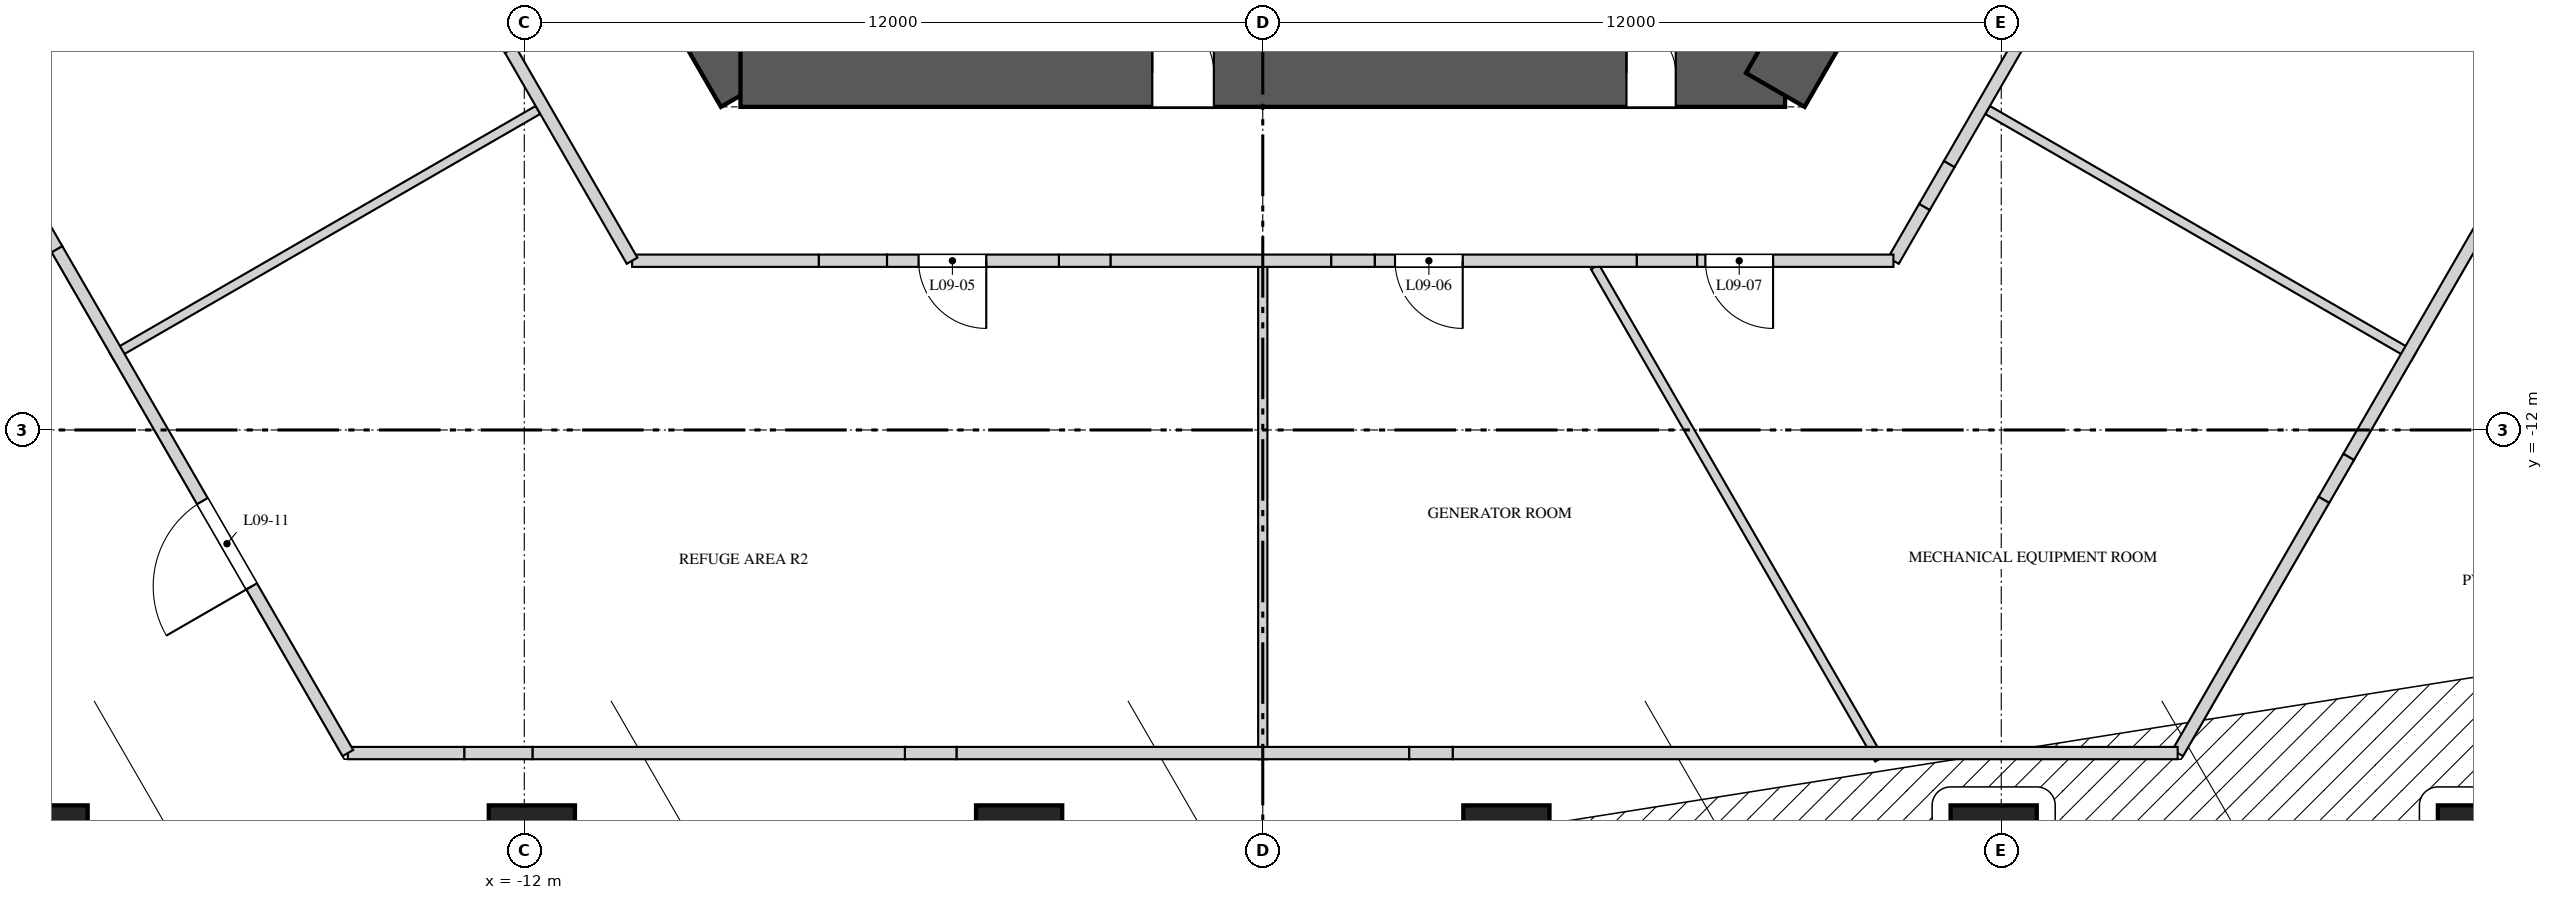
"""IFC4 building model, lengths in metres.
Left out: names, types, materials, properties, quantities, classifications, styles, units other than length and angle.
Written with IfcOpenShell. Run it as: python <this file> out.ifc"""

import sys

from ifc_helpers import new_model, si_unit, direction, frame, frame_2d, origin, origin_2d, place, context, subcontext, project, spatial, rectangle, extrude, element, fill, save


model = new_model("IFC4")
c1 = context("Model", 3, precision=1e-05, world=origin(), true_north=direction((0.0, 1.0)))
c2 = subcontext(c1, "Body", "Model", "MODEL_VIEW")
j1 = project(units=[si_unit("LENGTHUNIT", "METRE"), si_unit("PLANEANGLEUNIT", "RADIAN")], contexts=[c1])
p1 = place(None, origin())
s1 = spatial("IfcSite", under=j1, at=p1, CompositionType="ELEMENT")
p2 = place(p1, origin())
s2 = spatial("IfcBuilding", under=s1, at=p2, CompositionType="ELEMENT")
p3 = place(p2, frame((0.0, 0.0, 46.0)))
s3 = spatial("IfcBuildingStorey", under=s2, at=p3, CompositionType="ELEMENT", Elevation=46.0)
p4 = place(p3, frame((-9.772, -3.975, 0.0), z_axis=(0.0, 0.0, 1.0), x_axis=(0.499995765644, -0.866027848477, 0.0)))
e1 = element("IfcWall", 1, at=p4, inside=s3, PredefinedType="SHEAR", context=c2, shape_type="SweptSolid", body=[
    extrude(rectangle(XDim=2.887, YDim=1.1, at=frame_2d((1.443, 0.0))), origin(), (0.0, 0.0, 1.0), 5.2),
])
p5 = place(p3, frame((-8.487, -6.2, 0.0), z_axis=(0.0, 0.0, 1.0), x_axis=(1.0, 0.0, 0.0)))
e2 = element("IfcWall", 2, at=p5, inside=s3, PredefinedType="SHEAR", context=c2, shape_type="SweptSolid", body=[
    extrude(rectangle(XDim=16.974, YDim=1.1, at=frame_2d((8.487, 0.0))), origin(), (0.0, 0.0, 1.0), 5.2),
])
p6 = place(p5, frame((6.692, 0.0, 0.0)))
e3 = element("IfcOpeningElement", 3, at=p6, cuts=e2, PredefinedType="OPENING", context=c2, shape_type="SweptSolid", body=[
    extrude(rectangle(XDim=1.0, YDim=2.4, at=frame_2d((0.5, 1.2))), frame((0.0, 0.56, 0.0), z_axis=(0.0, -1.0, 0.0), x_axis=(1.0, 0.0, 0.0)), (0.0, 0.0, 1.0), 1.12),
])
p7 = place(p5, frame((14.397, 0.0, 0.0)))
e4 = element("IfcOpeningElement", 4, at=p7, cuts=e2, PredefinedType="OPENING", context=c2, shape_type="SweptSolid", body=[
    extrude(rectangle(XDim=0.8, YDim=2.1, at=frame_2d((0.4, 1.05))), frame((0.0, 0.56, 0.0), z_axis=(0.0, -1.0, 0.0), x_axis=(1.0, 0.0, 0.0)), (0.0, 0.0, 1.0), 1.12),
])
p8 = place(p3, frame((8.328, -6.475, 0.0), z_axis=(0.0, 0.0, 1.0), x_axis=(0.499995765644, 0.866027848477, 0.0)))
e5 = element("IfcWall", 5, at=p8, inside=s3, PredefinedType="SHEAR", context=c2, shape_type="SweptSolid", body=[
    extrude(rectangle(XDim=2.887, YDim=1.1, at=frame_2d((1.443, 0.0))), origin(), (0.0, 0.0, 1.0), 5.2),
])
for number, where, z_axis, x_axis in (
    (6, (-19.795, -18.55, 0.0), (0.0, 0.0, 1.0), (1.0, 0.0, 0.0)),
    (7, (-11.877, -18.55, 0.0), (0.0, 0.0, 1.0), (1.0, 0.0, 0.0)),
    (8, (-3.959, -18.55, 0.0), (0.0, 0.0, 1.0), (1.0, 0.0, 0.0)),
    (9, (3.959, -18.55, 0.0), (0.0, 0.0, 1.0), (1.0, 0.0, 0.0)),
    (10, (11.877, -18.55, 0.0), (0.0, 0.0, 1.0), (1.0, 0.0, 0.0)),
    (11, (19.795, -18.55, 0.0), (0.0, 0.0, 1.0), (1.0, 0.0, 0.0)),
):
    element("IfcColumn", number, at=place(p3, frame(where, z_axis=z_axis, x_axis=x_axis)), inside=s3, PredefinedType="COLUMN", context=c2, shape_type="SweptSolid", body=[
        extrude(rectangle(XDim=1.4, YDim=0.9, at=origin_2d()), origin(), (0.0, 0.0, 1.0), 2.898),
    ])
for number, where, z_axis, x_axis in (
    (12, (-11.778, -6.8, 0.0), (0.0, 0.0, 1.0), (-0.866, -0.5, 0.0)),
    (13, (0.0, -9.35, 0.0), (0.0, 0.0, 1.0), (0.0, -1.0, 0.0)),
):
    element("IfcWall", number, at=place(p3, frame(where, z_axis=z_axis, x_axis=x_axis)), inside=s3, PredefinedType="PARTITIONING", context=c2, shape_type="SweptSolid", body=[
        extrude(rectangle(XDim=8.0, YDim=0.15, at=frame_2d((4.0, 0.0))), origin(), (0.0, 0.0, 1.0), 4.85),
    ])
p9 = place(p3, frame((5.398, -9.35, 0.0), z_axis=(0.0, 0.0, 1.0), x_axis=(0.500007658653, -0.866020982014, 0.0)))
e14 = element("IfcWall", 14, at=p9, inside=s3, PredefinedType="PARTITIONING", context=c2, shape_type="SweptSolid", body=[
    extrude(rectangle(XDim=9.238, YDim=0.15, at=frame_2d((4.619, 0.0))), origin(), (0.0, 0.0, 1.0), 4.85),
])
p10 = place(p3, frame((11.778, -6.8, 0.0), z_axis=(0.0, 0.0, 1.0), x_axis=(0.866026010844, -0.49999894854, 0.0)))
e15 = element("IfcWall", 15, at=p10, inside=s3, PredefinedType="PARTITIONING", context=c2, shape_type="SweptSolid", body=[
    extrude(rectangle(XDim=8.0, YDim=0.15, at=frame_2d((4.0, 0.0))), origin(), (0.0, 0.0, 1.0), 4.85),
])
p11 = place(p3, frame((13.135, -4.25, 0.0), z_axis=(0.0, 0.0, 1.0), x_axis=(-0.499983883921, -0.866034708207, 0.0)))
e16 = element("IfcWall", 16, at=p11, inside=s3, PredefinedType="SOLIDWALL", context=c2, shape_type="SweptSolid", body=[
    extrude(rectangle(XDim=3.961, YDim=0.2, at=frame_2d((1.98, 0.0))), origin(), (0.0, 0.0, 1.0), 4.85),
])
p12 = place(p3, frame((11.154, -7.68, 0.0), z_axis=(0.0, 0.0, 1.0), x_axis=(-0.500151261923, -0.865938055058, 0.0)))
e17 = element("IfcWall", 17, at=p12, inside=s3, PredefinedType="SOLIDWALL", context=c2, shape_type="SweptSolid", body=[
    extrude(rectangle(XDim=0.805, YDim=0.2, at=frame_2d((0.402, 0.0))), origin(), (0.0, 0.0, 1.0), 3.95),
])
p13 = place(p3, frame((10.752, -8.377, 0.0), z_axis=(0.0, 0.0, 1.0), x_axis=(-0.499918237861, -0.866072604031, 0.0)))
e18 = element("IfcWall", 18, at=p13, inside=s3, PredefinedType="SOLIDWALL", context=c2, shape_type="SweptSolid", body=[
    extrude(rectangle(XDim=1.008, YDim=0.2, at=frame_2d((0.504, 0.0))), origin(), (0.0, 0.0, 1.0), 4.85),
])
p14 = place(p3, frame((10.248, -9.25, 0.0), z_axis=(0.0, 0.0, 1.0), x_axis=(-1.0, 0.0, 0.0)))
e19 = element("IfcWall", 19, at=p14, inside=s3, PredefinedType="SOLIDWALL", context=c2, shape_type="SweptSolid", body=[
    extrude(rectangle(XDim=3.191, YDim=0.2, at=frame_2d((1.595, 0.0))), origin(), (0.0, 0.0, 1.0), 4.85),
])
p15 = place(p14, frame((1.956, 0.0, 0.0)))
e20 = element("IfcOpeningElement", 20, at=p15, cuts=e19, PredefinedType="OPENING", context=c2, shape_type="SweptSolid", body=[
    extrude(rectangle(XDim=1.1, YDim=2.2, at=frame_2d((0.55, 1.1))), frame((0.0, 0.11, 0.0), z_axis=(0.0, -1.0, 0.0), x_axis=(1.0, 0.0, 0.0)), (0.0, 0.0, 1.0), 0.22),
])
p16 = place(p3, frame((7.057, -9.25, 0.0), z_axis=(0.0, 0.0, 1.0), x_axis=(-1.0, 0.0, 0.0)))
e21 = element("IfcWall", 21, at=p16, inside=s3, PredefinedType="SOLIDWALL", context=c2, shape_type="SweptSolid", body=[
    extrude(rectangle(XDim=0.981, YDim=0.2, at=frame_2d((0.491, 0.0))), origin(), (0.0, 0.0, 1.0), 3.95),
])
p17 = place(p3, frame((6.076, -9.25, 0.0), z_axis=(0.0, 0.0, 1.0), x_axis=(-1.0, 0.0, 0.0)))
e22 = element("IfcWall", 22, at=p17, inside=s3, PredefinedType="SOLIDWALL", context=c2, shape_type="SweptSolid", body=[
    extrude(rectangle(XDim=4.257, YDim=0.2, at=frame_2d((2.128, 0.0))), origin(), (0.0, 0.0, 1.0), 4.85),
])
p18 = place(p17, frame((2.827, 0.0, 0.0)))
e23 = element("IfcOpeningElement", 23, at=p18, cuts=e22, PredefinedType="OPENING", context=c2, shape_type="SweptSolid", body=[
    extrude(rectangle(XDim=1.1, YDim=2.2, at=frame_2d((0.55, 1.1))), frame((0.0, 0.11, 0.0), z_axis=(0.0, -1.0, 0.0), x_axis=(1.0, 0.0, 0.0)), (0.0, 0.0, 1.0), 0.22),
])
p19 = place(p3, frame((1.819, -9.25, 0.0), z_axis=(0.0, 0.0, 1.0), x_axis=(-1.0, 0.0, 0.0)))
e24 = element("IfcWall", 24, at=p19, inside=s3, PredefinedType="SOLIDWALL", context=c2, shape_type="SweptSolid", body=[
    extrude(rectangle(XDim=0.709, YDim=0.2, at=frame_2d((0.354, 0.0))), origin(), (0.0, 0.0, 1.0), 4.15),
])
p20 = place(p3, frame((1.111, -9.25, 0.0), z_axis=(0.0, 0.0, 1.0), x_axis=(-1.0, 0.0, 0.0)))
e25 = element("IfcWall", 25, at=p20, inside=s3, PredefinedType="SOLIDWALL", context=c2, shape_type="SweptSolid", body=[
    extrude(rectangle(XDim=3.585, YDim=0.2, at=frame_2d((1.792, 0.0))), origin(), (0.0, 0.0, 1.0), 4.85),
])
p21 = place(p3, frame((-2.475, -9.25, 0.0), z_axis=(0.0, 0.0, 1.0), x_axis=(-1.0, 0.0, 0.0)))
e26 = element("IfcWall", 26, at=p21, inside=s3, PredefinedType="SOLIDWALL", context=c2, shape_type="SweptSolid", body=[
    extrude(rectangle(XDim=0.838, YDim=0.2, at=frame_2d((0.419, 0.0))), origin(), (0.0, 0.0, 1.0), 3.95),
])
p22 = place(p3, frame((-3.313, -9.25, 0.0), z_axis=(0.0, 0.0, 1.0), x_axis=(-1.0, 0.0, 0.0)))
e27 = element("IfcWall", 27, at=p22, inside=s3, PredefinedType="SOLIDWALL", context=c2, shape_type="SweptSolid", body=[
    extrude(rectangle(XDim=2.794, YDim=0.2, at=frame_2d((1.397, 0.0))), origin(), (0.0, 0.0, 1.0), 4.85),
])
p23 = place(p22, frame((1.18, 0.0, 0.0)))
e28 = element("IfcOpeningElement", 28, at=p23, cuts=e27, PredefinedType="OPENING", context=c2, shape_type="SweptSolid", body=[
    extrude(rectangle(XDim=1.1, YDim=2.2, at=frame_2d((0.55, 1.1))), frame((0.0, 0.11, 0.0), z_axis=(0.0, -1.0, 0.0), x_axis=(1.0, 0.0, 0.0)), (0.0, 0.0, 1.0), 0.22),
])
p24 = place(p3, frame((-6.106, -9.25, 0.0), z_axis=(0.0, 0.0, 1.0), x_axis=(-1.0, 0.0, 0.0)))
e29 = element("IfcWall", 29, at=p24, inside=s3, PredefinedType="SOLIDWALL", context=c2, shape_type="SweptSolid", body=[
    extrude(rectangle(XDim=1.109, YDim=0.2, at=frame_2d((0.554, 0.0))), origin(), (0.0, 0.0, 1.0), 3.75),
])
p25 = place(p3, frame((-7.215, -9.25, 0.0), z_axis=(0.0, 0.0, 1.0), x_axis=(-1.0, 0.0, 0.0)))
e30 = element("IfcWall", 30, at=p25, inside=s3, PredefinedType="SOLIDWALL", context=c2, shape_type="SweptSolid", body=[
    extrude(rectangle(XDim=3.033, YDim=0.2, at=frame_2d((1.516, 0.0))), origin(), (0.0, 0.0, 1.0), 4.85),
])
p26 = place(p3, frame((-10.248, -9.25, 0.0), z_axis=(0.0, 0.0, 1.0), x_axis=(-0.499983883921, 0.866034708207, 0.0)))
e31 = element("IfcWall", 31, at=p26, inside=s3, PredefinedType="SOLIDWALL", context=c2, shape_type="SweptSolid", body=[
    extrude(rectangle(XDim=3.961, YDim=0.2, at=frame_2d((1.98, 0.0))), origin(), (0.0, 0.0, 1.0), 4.85),
])
p27 = place(p3, frame((-12.229, -5.82, 0.0), z_axis=(0.0, 0.0, 1.0), x_axis=(-0.499923776705, 0.866069406852, 0.0)))
e32 = element("IfcWall", 32, at=p27, inside=s3, PredefinedType="SOLIDWALL", context=c2, shape_type="SweptSolid", body=[
    extrude(rectangle(XDim=0.805, YDim=0.2, at=frame_2d((0.402, 0.0))), origin(), (0.0, 0.0, 1.0), 3.95),
])
p28 = place(p3, frame((22.372, -4.25, 0.0), z_axis=(0.0, 0.0, 1.0), x_axis=(-0.50000482836, -0.866022616111, 0.0)))
e33 = element("IfcWall", 33, at=p28, inside=s3, PredefinedType="SOLIDWALL", context=c2, shape_type="SweptSolid", body=[
    extrude(rectangle(XDim=9.455, YDim=0.2, at=frame_2d((4.728, 0.0))), origin(), (0.0, 0.0, 1.0), 4.85),
])
p29 = place(p3, frame((17.645, -12.438, 0.0), z_axis=(0.0, 0.0, 1.0), x_axis=(-0.499923776705, -0.866069406852, 0.0)))
e34 = element("IfcWall", 34, at=p29, inside=s3, PredefinedType="SOLIDWALL", context=c2, shape_type="SweptSolid", body=[
    extrude(rectangle(XDim=0.805, YDim=0.2, at=frame_2d((0.402, 0.0))), origin(), (0.0, 0.0, 1.0), 3.95),
])
p30 = place(p3, frame((17.242, -13.135, 0.0), z_axis=(0.0, 0.0, 1.0), x_axis=(-0.500013047366, -0.866017870753, 0.0)))
e35 = element("IfcWall", 35, at=p30, inside=s3, PredefinedType="SOLIDWALL", context=c2, shape_type="SweptSolid", body=[
    extrude(rectangle(XDim=4.751, YDim=0.2, at=frame_2d((2.375, 0.0))), origin(), (0.0, 0.0, 1.0), 4.85),
])
p31 = place(p3, frame((14.867, -17.25, 0.0), z_axis=(0.0, 0.0, 1.0), x_axis=(-1.0, 0.0, 0.0)))
e36 = element("IfcWall", 36, at=p31, inside=s3, PredefinedType="SOLIDWALL", context=c2, shape_type="SweptSolid", body=[
    extrude(rectangle(XDim=11.78, YDim=0.2, at=frame_2d((5.89, 0.0))), origin(), (0.0, 0.0, 1.0), 4.85),
])
p32 = place(p3, frame((3.086, -17.25, 0.0), z_axis=(0.0, 0.0, 1.0), x_axis=(-1.0, 0.0, 0.0)))
e37 = element("IfcWall", 37, at=p32, inside=s3, PredefinedType="SOLIDWALL", context=c2, shape_type="SweptSolid", body=[
    extrude(rectangle(XDim=0.709, YDim=0.2, at=frame_2d((0.354, 0.0))), origin(), (0.0, 0.0, 1.0), 4.15),
])
p33 = place(p3, frame((2.378, -17.25, 0.0), z_axis=(0.0, 0.0, 1.0), x_axis=(-1.0, 0.0, 0.0)))
e38 = element("IfcWall", 38, at=p33, inside=s3, PredefinedType="SOLIDWALL", context=c2, shape_type="SweptSolid", body=[
    extrude(rectangle(XDim=7.355, YDim=0.2, at=frame_2d((3.677, 0.0))), origin(), (0.0, 0.0, 1.0), 4.85),
])
p34 = place(p3, frame((-4.977, -17.25, 0.0), z_axis=(0.0, 0.0, 1.0), x_axis=(-1.0, 0.0, 0.0)))
e39 = element("IfcWall", 39, at=p34, inside=s3, PredefinedType="SOLIDWALL", context=c2, shape_type="SweptSolid", body=[
    extrude(rectangle(XDim=0.838, YDim=0.2, at=frame_2d((0.419, 0.0))), origin(), (0.0, 0.0, 1.0), 3.95),
])
p35 = place(p3, frame((-5.815, -17.25, 0.0), z_axis=(0.0, 0.0, 1.0), x_axis=(-1.0, 0.0, 0.0)))
e40 = element("IfcWall", 40, at=p35, inside=s3, PredefinedType="SOLIDWALL", context=c2, shape_type="SweptSolid", body=[
    extrude(rectangle(XDim=6.052, YDim=0.2, at=frame_2d((3.026, 0.0))), origin(), (0.0, 0.0, 1.0), 4.85),
])
p36 = place(p3, frame((-11.867, -17.25, 0.0), z_axis=(0.0, 0.0, 1.0), x_axis=(-1.0, 0.0, 0.0)))
e41 = element("IfcWall", 41, at=p36, inside=s3, PredefinedType="SOLIDWALL", context=c2, shape_type="SweptSolid", body=[
    extrude(rectangle(XDim=1.109, YDim=0.2, at=frame_2d((0.554, 0.0))), origin(), (0.0, 0.0, 1.0), 3.75),
])
p37 = place(p3, frame((-12.976, -17.25, 0.0), z_axis=(0.0, 0.0, 1.0), x_axis=(-1.0, 0.0, 0.0)))
e42 = element("IfcWall", 42, at=p37, inside=s3, PredefinedType="SOLIDWALL", context=c2, shape_type="SweptSolid", body=[
    extrude(rectangle(XDim=1.891, YDim=0.2, at=frame_2d((0.945, 0.0))), origin(), (0.0, 0.0, 1.0), 4.85),
])
p38 = place(p3, frame((-14.867, -17.25, 0.0), z_axis=(0.0, 0.0, 1.0), x_axis=(-0.50000482836, 0.866022616111, 0.0)))
e43 = element("IfcWall", 43, at=p38, inside=s3, PredefinedType="SOLIDWALL", context=c2, shape_type="SweptSolid", body=[
    extrude(rectangle(XDim=9.455, YDim=0.2, at=frame_2d((4.728, 0.0))), origin(), (0.0, 0.0, 1.0), 4.85),
])
p39 = place(p38, frame((3.128, 0.0, 0.0)))
e44 = element("IfcOpeningElement", 44, at=p39, cuts=e43, PredefinedType="OPENING", context=c2, shape_type="SweptSolid", body=[
    extrude(rectangle(XDim=1.6, YDim=2.3, at=frame_2d((0.8, 1.15))), frame((0.0, 0.11, 0.0), z_axis=(0.0, -1.0, 0.0), x_axis=(1.0, 0.0, 0.0)), (0.0, 0.0, 1.0), 0.22),
])
p40 = place(p3, frame((-19.594, -9.062, 0.0), z_axis=(0.0, 0.0, 1.0), x_axis=(-0.499923776705, 0.866069406852, 0.0)))
e45 = element("IfcWall", 45, at=p40, inside=s3, PredefinedType="SOLIDWALL", context=c2, shape_type="SweptSolid", body=[
    extrude(rectangle(XDim=0.805, YDim=0.2, at=frame_2d((0.402, 0.0))), origin(), (0.0, 0.0, 1.0), 3.95),
])
p41 = place(p6, origin())
e46 = element("IfcDoor", 46, at=p41, inside=s3, OperationType="SINGLE_SWING_LEFT", PredefinedType="DOOR", context=c2, shape_type="SweptSolid", body=[
    extrude(rectangle(XDim=1.0, YDim=2.4, at=frame_2d((0.5, 1.2))), frame((0.0, 0.025, 0.0), z_axis=(0.0, -1.0, 0.0), x_axis=(1.0, 0.0, 0.0)), (0.0, 0.0, 1.0), 0.05),
])
fill(e3, e46)
p42 = place(p7, origin())
e47 = element("IfcDoor", 47, at=p42, inside=s3, OperationType="SINGLE_SWING_LEFT", PredefinedType="DOOR", context=c2, shape_type="SweptSolid", body=[
    extrude(rectangle(XDim=0.8, YDim=2.1, at=frame_2d((0.4, 1.05))), frame((0.0, 0.025, 0.0), z_axis=(0.0, -1.0, 0.0), x_axis=(1.0, 0.0, 0.0)), (0.0, 0.0, 1.0), 0.05),
])
fill(e4, e47)
p43 = place(p23, origin())
e48 = element("IfcDoor", 48, at=p43, inside=s3, OperationType="SINGLE_SWING_LEFT", PredefinedType="DOOR", context=c2, shape_type="SweptSolid", body=[
    extrude(rectangle(XDim=1.1, YDim=2.2, at=frame_2d((0.55, 1.1))), frame((0.0, 0.025, 0.0), z_axis=(0.0, -1.0, 0.0), x_axis=(1.0, 0.0, 0.0)), (0.0, 0.0, 1.0), 0.05),
])
fill(e28, e48)
p44 = place(p18, origin())
e49 = element("IfcDoor", 49, at=p44, inside=s3, OperationType="SINGLE_SWING_RIGHT", PredefinedType="DOOR", context=c2, shape_type="SweptSolid", body=[
    extrude(rectangle(XDim=1.1, YDim=2.2, at=frame_2d((0.55, 1.1))), frame((0.0, 0.025, 0.0), z_axis=(0.0, -1.0, 0.0), x_axis=(1.0, 0.0, 0.0)), (0.0, 0.0, 1.0), 0.05),
])
fill(e23, e49)
p45 = place(p15, origin())
e50 = element("IfcDoor", 50, at=p45, inside=s3, OperationType="SINGLE_SWING_LEFT", PredefinedType="DOOR", context=c2, shape_type="SweptSolid", body=[
    extrude(rectangle(XDim=1.1, YDim=2.2, at=frame_2d((0.55, 1.1))), frame((0.0, 0.025, 0.0), z_axis=(0.0, -1.0, 0.0), x_axis=(1.0, 0.0, 0.0)), (0.0, 0.0, 1.0), 0.05),
])
fill(e20, e50)
p46 = place(p39, origin())
e51 = element("IfcDoor", 51, at=p46, inside=s3, OperationType="DOUBLE_DOOR_SINGLE_SWING", PredefinedType="DOOR", context=c2, shape_type="SweptSolid", body=[
    extrude(rectangle(XDim=1.6, YDim=2.3, at=frame_2d((0.8, 1.15))), frame((0.0, 0.025, 0.0), z_axis=(0.0, -1.0, 0.0), x_axis=(1.0, 0.0, 0.0)), (0.0, 0.0, 1.0), 0.05),
])
fill(e44, e51)
save(model, sys.argv[1])
